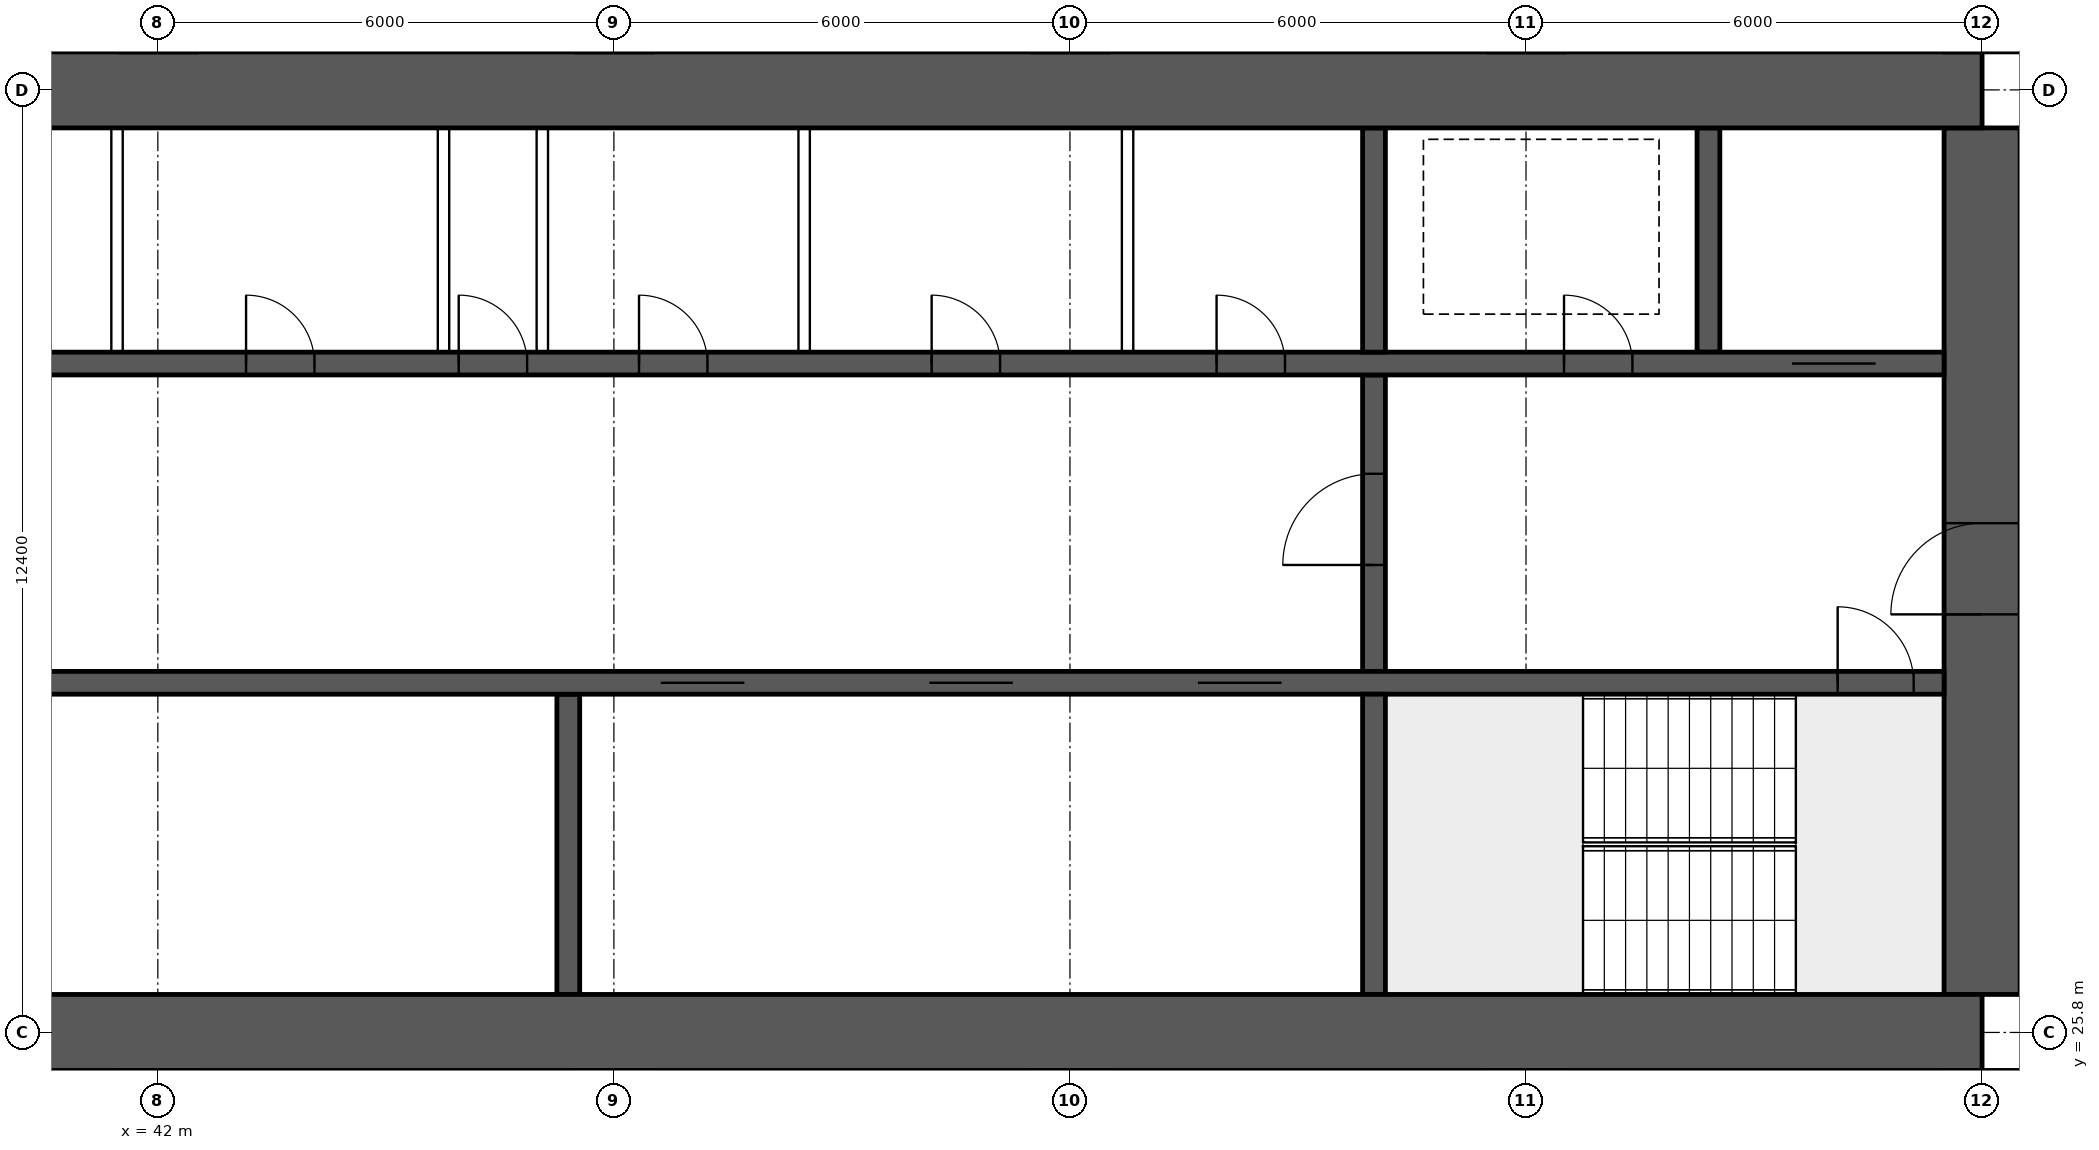
"""IFC4 building model, lengths in metres.
Left out: names, types, materials, properties, quantities, classifications, styles, units other than length and angle.
Written with IfcOpenShell. Run it as: python <this file> out.ifc"""

import sys

from ifc_helpers import new_model, si_unit, direction, frame, frame_2d, origin, place, context, subcontext, project, spatial, rectangle, extrude, element, fill, save


model = new_model("IFC4")
c1 = context("Model", 3, precision=1e-05, world=origin(), true_north=direction((0.0, 1.0)))
c2 = subcontext(c1, "Body", "Model", "MODEL_VIEW")
j1 = project(units=[si_unit("LENGTHUNIT", "METRE"), si_unit("PLANEANGLEUNIT", "RADIAN")], contexts=[c1])
p1 = place(None, origin())
s1 = spatial("IfcSite", under=j1, at=p1, CompositionType="ELEMENT")
p2 = place(p1, origin())
s2 = spatial("IfcBuilding", under=s1, at=p2, CompositionType="ELEMENT")
p3 = place(p2, frame((0.0, 0.0, 23.95)))
s3 = spatial("IfcBuildingStorey", under=s2, at=p3, CompositionType="ELEMENT", Elevation=23.95)
for number, where, z_axis, x_axis in (
    (1, (18.0, 25.8, 0.0), (0.0, 0.0, 1.0), (1.0, 0.0, 0.0)),
    (2, (18.0, 38.2, 0.0), (0.0, 0.0, 1.0), (1.0, 0.0, 0.0)),
):
    element("IfcWall", number, at=place(p3, frame(where, z_axis=z_axis, x_axis=x_axis)), inside=s3, PredefinedType="SHEAR", context=c2, shape_type="SweptSolid", body=[
        extrude(rectangle(XDim=48.0, YDim=1.0, at=frame_2d((24.0, 0.0))), origin(), (0.0, 0.0, 1.0), 3.75),
    ])
p4 = place(p3, frame((66.0, 26.3, 0.0), z_axis=(0.0, 0.0, 1.0), x_axis=(0.0, 1.0, 0.0)))
e3 = element("IfcWall", 3, at=p4, inside=s3, PredefinedType="SHEAR", context=c2, shape_type="SweptSolid", body=[
    extrude(rectangle(XDim=11.4, YDim=1.0, at=frame_2d((5.7, 0.0))), origin(), (0.0, 0.0, 1.0), 3.75),
])
p5 = place(p4, frame((5.0, 0.0, 0.0)))
e4 = element("IfcOpeningElement", 4, at=p5, cuts=e3, PredefinedType="OPENING", context=c2, shape_type="SweptSolid", body=[
    extrude(rectangle(XDim=1.2, YDim=2.1, at=frame_2d((0.6, 1.05))), frame((0.0, 0.51, 0.0), z_axis=(0.0, -1.0, 0.0), x_axis=(1.0, 0.0, 0.0)), (0.0, 0.0, 1.0), 1.02),
])
p6 = place(p3, frame((18.5, 30.4, 0.0), z_axis=(0.0, 0.0, 1.0), x_axis=(1.0, 0.0, 0.0)))
e5 = element("IfcWall", 5, at=p6, inside=s3, PredefinedType="SHEAR", context=c2, shape_type="SweptSolid", body=[
    extrude(rectangle(XDim=47.0, YDim=0.3, at=frame_2d((23.5, 0.0))), origin(), (0.0, 0.0, 1.0), 3.75),
])
p7 = place(p6, frame((0.4, 0.0, 0.0)))
e6 = element("IfcOpeningElement", 6, at=p7, cuts=e5, PredefinedType="OPENING", context=c2, shape_type="SweptSolid", body=[
    extrude(rectangle(XDim=1.0, YDim=2.1, at=frame_2d((0.5, 1.05))), frame((0.0, 0.16, 0.0), z_axis=(0.0, -1.0, 0.0), x_axis=(1.0, 0.0, 0.0)), (0.0, 0.0, 1.0), 0.32),
])
p8 = place(p6, frame((45.6, 0.0, 0.0)))
e7 = element("IfcOpeningElement", 7, at=p8, cuts=e5, PredefinedType="OPENING", context=c2, shape_type="SweptSolid", body=[
    extrude(rectangle(XDim=1.0, YDim=2.1, at=frame_2d((0.5, 1.05))), frame((0.0, 0.16, 0.0), z_axis=(0.0, -1.0, 0.0), x_axis=(1.0, 0.0, 0.0)), (0.0, 0.0, 1.0), 0.32),
])
p9 = place(p6, frame((8.25, 0.0, 0.0)))
e8 = element("IfcOpeningElement", 8, at=p9, cuts=e5, PredefinedType="OPENING", context=c2, shape_type="SweptSolid", body=[
    extrude(rectangle(XDim=1.1, YDim=2.1, at=frame_2d((0.55, 1.05))), frame((0.0, 0.16, 0.0), z_axis=(0.0, -1.0, 0.0), x_axis=(1.0, 0.0, 0.0)), (0.0, 0.0, 1.0), 0.32),
])
p10 = place(p6, frame((10.85, 0.0, 0.0)))
e9 = element("IfcOpeningElement", 9, at=p10, cuts=e5, PredefinedType="OPENING", context=c2, shape_type="SweptSolid", body=[
    extrude(rectangle(XDim=1.1, YDim=2.1, at=frame_2d((0.55, 1.05))), frame((0.0, 0.16, 0.0), z_axis=(0.0, -1.0, 0.0), x_axis=(1.0, 0.0, 0.0)), (0.0, 0.0, 1.0), 0.32),
])
p11 = place(p6, frame((13.45, 0.0, 0.0)))
e10 = element("IfcOpeningElement", 10, at=p11, cuts=e5, PredefinedType="OPENING", context=c2, shape_type="SweptSolid", body=[
    extrude(rectangle(XDim=1.1, YDim=2.1, at=frame_2d((0.55, 1.05))), frame((0.0, 0.16, 0.0), z_axis=(0.0, -1.0, 0.0), x_axis=(1.0, 0.0, 0.0)), (0.0, 0.0, 1.0), 0.32),
])
p12 = place(p6, frame((16.05, 0.0, 0.0)))
e11 = element("IfcOpeningElement", 11, at=p12, cuts=e5, PredefinedType="OPENING", context=c2, shape_type="SweptSolid", body=[
    extrude(rectangle(XDim=1.1, YDim=2.1, at=frame_2d((0.55, 1.05))), frame((0.0, 0.16, 0.0), z_axis=(0.0, -1.0, 0.0), x_axis=(1.0, 0.0, 0.0)), (0.0, 0.0, 1.0), 0.32),
])
p13 = place(p6, frame((30.117, 0.0, 0.0)))
e12 = element("IfcOpeningElement", 12, at=p13, cuts=e5, PredefinedType="OPENING", context=c2, shape_type="SweptSolid", body=[
    extrude(rectangle(XDim=1.1, YDim=2.1, at=frame_2d((0.55, 1.05))), frame((0.0, 0.16, 0.0), z_axis=(0.0, -1.0, 0.0), x_axis=(1.0, 0.0, 0.0)), (0.0, 0.0, 1.0), 0.32),
])
p14 = place(p6, frame((33.65, 0.0, 0.0)))
e13 = element("IfcOpeningElement", 13, at=p14, cuts=e5, PredefinedType="OPENING", context=c2, shape_type="SweptSolid", body=[
    extrude(rectangle(XDim=1.1, YDim=2.1, at=frame_2d((0.55, 1.05))), frame((0.0, 0.16, 0.0), z_axis=(0.0, -1.0, 0.0), x_axis=(1.0, 0.0, 0.0)), (0.0, 0.0, 1.0), 0.32),
])
p15 = place(p6, frame((37.183, 0.0, 0.0)))
e14 = element("IfcOpeningElement", 14, at=p15, cuts=e5, PredefinedType="OPENING", context=c2, shape_type="SweptSolid", body=[
    extrude(rectangle(XDim=1.1, YDim=2.1, at=frame_2d((0.55, 1.05))), frame((0.0, 0.16, 0.0), z_axis=(0.0, -1.0, 0.0), x_axis=(1.0, 0.0, 0.0)), (0.0, 0.0, 1.0), 0.32),
])
p16 = place(p3, frame((18.5, 34.6, 0.0), z_axis=(0.0, 0.0, 1.0), x_axis=(1.0, 0.0, 0.0)))
e15 = element("IfcWall", 15, at=p16, inside=s3, PredefinedType="SHEAR", context=c2, shape_type="SweptSolid", body=[
    extrude(rectangle(XDim=47.0, YDim=0.3, at=frame_2d((23.5, 0.0))), origin(), (0.0, 0.0, 1.0), 3.75),
])
p17 = place(p16, frame((0.9, 0.0, 0.0)))
e16 = element("IfcOpeningElement", 16, at=p17, cuts=e15, PredefinedType="OPENING", context=c2, shape_type="SweptSolid", body=[
    extrude(rectangle(XDim=1.1, YDim=2.1, at=frame_2d((0.55, 1.05))), frame((0.0, 0.16, 0.0), z_axis=(0.0, -1.0, 0.0), x_axis=(1.0, 0.0, 0.0)), (0.0, 0.0, 1.0), 0.32),
])
p18 = place(p16, frame((45.0, 0.0, 0.0)))
e17 = element("IfcOpeningElement", 17, at=p18, cuts=e15, PredefinedType="OPENING", context=c2, shape_type="SweptSolid", body=[
    extrude(rectangle(XDim=1.1, YDim=2.1, at=frame_2d((0.55, 1.05))), frame((0.0, 0.16, 0.0), z_axis=(0.0, -1.0, 0.0), x_axis=(1.0, 0.0, 0.0)), (0.0, 0.0, 1.0), 0.32),
])
p19 = place(p16, frame((4.1, 0.0, 0.0)))
e18 = element("IfcOpeningElement", 18, at=p19, cuts=e15, PredefinedType="OPENING", context=c2, shape_type="SweptSolid", body=[
    extrude(rectangle(XDim=0.9, YDim=2.1, at=frame_2d((0.45, 1.05))), frame((0.0, 0.16, 0.0), z_axis=(0.0, -1.0, 0.0), x_axis=(1.0, 0.0, 0.0)), (0.0, 0.0, 1.0), 0.32),
])
p20 = place(p16, frame((42.0, 0.0, 0.0)))
e19 = element("IfcOpeningElement", 19, at=p20, cuts=e15, PredefinedType="OPENING", context=c2, shape_type="SweptSolid", body=[
    extrude(rectangle(XDim=0.9, YDim=2.1, at=frame_2d((0.45, 1.05))), frame((0.0, 0.16, 0.0), z_axis=(0.0, -1.0, 0.0), x_axis=(1.0, 0.0, 0.0)), (0.0, 0.0, 1.0), 0.32),
])
p21 = place(p16, frame((8.875, 0.0, 0.0)))
e20 = element("IfcOpeningElement", 20, at=p21, cuts=e15, PredefinedType="OPENING", context=c2, shape_type="SweptSolid", body=[
    extrude(rectangle(XDim=0.9, YDim=2.1, at=frame_2d((0.45, 1.05))), frame((0.0, 0.16, 0.0), z_axis=(0.0, -1.0, 0.0), x_axis=(1.0, 0.0, 0.0)), (0.0, 0.0, 1.0), 0.32),
])
p22 = place(p16, frame((12.849, 0.0, 0.0)))
e21 = element("IfcOpeningElement", 21, at=p22, cuts=e15, PredefinedType="OPENING", context=c2, shape_type="SweptSolid", body=[
    extrude(rectangle(XDim=0.9, YDim=2.1, at=frame_2d((0.45, 1.05))), frame((0.0, 0.16, 0.0), z_axis=(0.0, -1.0, 0.0), x_axis=(1.0, 0.0, 0.0)), (0.0, 0.0, 1.0), 0.32),
])
p23 = place(p16, frame((16.496, 0.0, 0.0)))
e22 = element("IfcOpeningElement", 22, at=p23, cuts=e15, PredefinedType="OPENING", context=c2, shape_type="SweptSolid", body=[
    extrude(rectangle(XDim=0.9, YDim=2.1, at=frame_2d((0.45, 1.05))), frame((0.0, 0.16, 0.0), z_axis=(0.0, -1.0, 0.0), x_axis=(1.0, 0.0, 0.0)), (0.0, 0.0, 1.0), 0.32),
])
p24 = place(p16, frame((20.255, 0.0, 0.0)))
e23 = element("IfcOpeningElement", 23, at=p24, cuts=e15, PredefinedType="OPENING", context=c2, shape_type="SweptSolid", body=[
    extrude(rectangle(XDim=0.9, YDim=2.1, at=frame_2d((0.45, 1.05))), frame((0.0, 0.16, 0.0), z_axis=(0.0, -1.0, 0.0), x_axis=(1.0, 0.0, 0.0)), (0.0, 0.0, 1.0), 0.32),
])
p25 = place(p16, frame((24.661, 0.0, 0.0)))
e24 = element("IfcOpeningElement", 24, at=p25, cuts=e15, PredefinedType="OPENING", context=c2, shape_type="SweptSolid", body=[
    extrude(rectangle(XDim=0.9, YDim=2.1, at=frame_2d((0.45, 1.05))), frame((0.0, 0.16, 0.0), z_axis=(0.0, -1.0, 0.0), x_axis=(1.0, 0.0, 0.0)), (0.0, 0.0, 1.0), 0.32),
])
p26 = place(p16, frame((27.458, 0.0, 0.0)))
e25 = element("IfcOpeningElement", 25, at=p26, cuts=e15, PredefinedType="OPENING", context=c2, shape_type="SweptSolid", body=[
    extrude(rectangle(XDim=0.9, YDim=2.1, at=frame_2d((0.45, 1.05))), frame((0.0, 0.16, 0.0), z_axis=(0.0, -1.0, 0.0), x_axis=(1.0, 0.0, 0.0)), (0.0, 0.0, 1.0), 0.32),
])
p27 = place(p16, frame((29.831, 0.0, 0.0)))
e26 = element("IfcOpeningElement", 26, at=p27, cuts=e15, PredefinedType="OPENING", context=c2, shape_type="SweptSolid", body=[
    extrude(rectangle(XDim=0.9, YDim=2.1, at=frame_2d((0.45, 1.05))), frame((0.0, 0.16, 0.0), z_axis=(0.0, -1.0, 0.0), x_axis=(1.0, 0.0, 0.0)), (0.0, 0.0, 1.0), 0.32),
])
p28 = place(p16, frame((33.68, 0.0, 0.0)))
e27 = element("IfcOpeningElement", 27, at=p28, cuts=e15, PredefinedType="OPENING", context=c2, shape_type="SweptSolid", body=[
    extrude(rectangle(XDim=0.9, YDim=2.1, at=frame_2d((0.45, 1.05))), frame((0.0, 0.16, 0.0), z_axis=(0.0, -1.0, 0.0), x_axis=(1.0, 0.0, 0.0)), (0.0, 0.0, 1.0), 0.32),
])
p29 = place(p16, frame((37.429, 0.0, 0.0)))
e28 = element("IfcOpeningElement", 28, at=p29, cuts=e15, PredefinedType="OPENING", context=c2, shape_type="SweptSolid", body=[
    extrude(rectangle(XDim=0.9, YDim=2.1, at=frame_2d((0.45, 1.05))), frame((0.0, 0.16, 0.0), z_axis=(0.0, -1.0, 0.0), x_axis=(1.0, 0.0, 0.0)), (0.0, 0.0, 1.0), 0.32),
])
p30 = place(p3, frame((58.0, 26.3, 0.0), z_axis=(0.0, 0.0, 1.0), x_axis=(0.0, 1.0, 0.0)))
e29 = element("IfcWall", 29, at=p30, inside=s3, PredefinedType="SHEAR", context=c2, shape_type="SweptSolid", body=[
    extrude(rectangle(XDim=3.95, YDim=0.3, at=frame_2d((1.975, 0.0))), origin(), (0.0, 0.0, 1.0), 3.75),
])
p31 = place(p3, frame((58.0, 30.55, 0.0), z_axis=(0.0, 0.0, 1.0), x_axis=(0.0, 1.0, 0.0)))
e30 = element("IfcWall", 30, at=p31, inside=s3, PredefinedType="SHEAR", context=c2, shape_type="SweptSolid", body=[
    extrude(rectangle(XDim=3.9, YDim=0.3, at=frame_2d((1.95, 0.0))), origin(), (0.0, 0.0, 1.0), 3.75),
])
p32 = place(p31, frame((1.4, 0.0, 0.0)))
e31 = element("IfcOpeningElement", 31, at=p32, cuts=e30, PredefinedType="OPENING", context=c2, shape_type="SweptSolid", body=[
    extrude(rectangle(XDim=1.2, YDim=2.1, at=frame_2d((0.6, 1.05))), frame((0.0, 0.16, 0.0), z_axis=(0.0, -1.0, 0.0), x_axis=(1.0, 0.0, 0.0)), (0.0, 0.0, 1.0), 0.32),
])
for number, where, z_axis, x_axis in (
    (32, (62.4, 34.75, 0.0), (0.0, 0.0, 1.0), (0.0, 1.0, 0.0)),
    (33, (58.0, 34.75, 0.0), (0.0, 0.0, 1.0), (0.0, 1.0, 0.0)),
):
    element("IfcWall", number, at=place(p3, frame(where, z_axis=z_axis, x_axis=x_axis)), inside=s3, PredefinedType="SHEAR", context=c2, shape_type="SweptSolid", body=[
        extrude(rectangle(XDim=2.95, YDim=0.3, at=frame_2d((1.475, 0.0))), origin(), (0.0, 0.0, 1.0), 3.75),
    ])
p33 = place(p3, frame((47.4, 26.3, 0.0), z_axis=(0.0, 0.0, 1.0), x_axis=(0.0, 1.0, 0.0)))
e34 = element("IfcWall", 34, at=p33, inside=s3, PredefinedType="SHEAR", context=c2, shape_type="SweptSolid", body=[
    extrude(rectangle(XDim=3.95, YDim=0.3, at=frame_2d((1.975, 0.0))), origin(), (0.0, 0.0, 1.0), 3.75),
])
for number, where, z_axis, x_axis in (
    (35, (41.463, 34.75, 0.0), (0.0, 0.0, 1.0), (0.0, 1.0, 0.0)),
    (36, (45.758, 34.75, 0.0), (0.0, 0.0, 1.0), (0.0, 1.0, 0.0)),
    (37, (47.058, 34.75, 0.0), (0.0, 0.0, 1.0), (0.0, 1.0, 0.0)),
    (38, (50.503, 34.75, 0.0), (0.0, 0.0, 1.0), (0.0, 1.0, 0.0)),
    (39, (54.758, 34.75, 0.0), (0.0, 0.0, 1.0), (0.0, 1.0, 0.0)),
):
    element("IfcWall", number, at=place(p3, frame(where, z_axis=z_axis, x_axis=x_axis)), inside=s3, PredefinedType="SOLIDWALL", context=c2, shape_type="SweptSolid", body=[
        extrude(rectangle(XDim=2.95, YDim=0.15, at=frame_2d((1.475, 0.0))), origin(), (0.0, 0.0, 1.0), 3.5),
    ])
for number, where, z_axis, x_axis in (
    (40, (44.6, 14.9, 0.0), (0.0, 0.0, 1.0), (0.0, 1.0, 0.0)),
    (41, (57.6, 14.9, 0.0), (0.0, 0.0, 1.0), (0.0, 1.0, 0.0)),
):
    element("IfcWall", number, at=place(p3, frame(where, z_axis=z_axis, x_axis=x_axis)), inside=s3, PredefinedType="PARTITIONING", context=c2, shape_type="SweptSolid", body=[
        extrude(rectangle(XDim=10.4, YDim=0.15, at=frame_2d((5.2, 0.0))), origin(), (0.0, 0.0, 1.0), 3.5),
    ])
p34 = place(p5, origin())
e42 = element("IfcDoor", 42, at=p34, inside=s3, OperationType="SINGLE_SWING_LEFT", PredefinedType="DOOR", context=c2, shape_type="SweptSolid", body=[
    extrude(rectangle(XDim=1.2, YDim=2.1, at=frame_2d((0.6, 1.05))), frame((0.0, 0.025, 0.0), z_axis=(0.0, -1.0, 0.0), x_axis=(1.0, 0.0, 0.0)), (0.0, 0.0, 1.0), 0.05),
])
fill(e4, e42)
p35 = place(p8, origin())
e43 = element("IfcDoor", 43, at=p35, inside=s3, OperationType="SINGLE_SWING_LEFT", PredefinedType="DOOR", context=c2, shape_type="SweptSolid", body=[
    extrude(rectangle(XDim=1.0, YDim=2.1, at=frame_2d((0.5, 1.05))), frame((0.0, 0.025, 0.0), z_axis=(0.0, -1.0, 0.0), x_axis=(1.0, 0.0, 0.0)), (0.0, 0.0, 1.0), 0.05),
])
fill(e7, e43)
p36 = place(p18, origin())
e44 = element("IfcDoor", 44, at=p36, inside=s3, OperationType="DOUBLE_DOOR_SLIDING", PredefinedType="DOOR", context=c2, shape_type="SweptSolid", body=[
    extrude(rectangle(XDim=1.1, YDim=2.1, at=frame_2d((0.55, 1.05))), frame((0.0, 0.025, 0.0), z_axis=(0.0, -1.0, 0.0), x_axis=(1.0, 0.0, 0.0)), (0.0, 0.0, 1.0), 0.05),
])
fill(e17, e44)
p37 = place(p20, origin())
e45 = element("IfcDoor", 45, at=p37, inside=s3, OperationType="SINGLE_SWING_LEFT", PredefinedType="DOOR", context=c2, shape_type="SweptSolid", body=[
    extrude(rectangle(XDim=0.9, YDim=2.1, at=frame_2d((0.45, 1.05))), frame((0.0, 0.025, 0.0), z_axis=(0.0, -1.0, 0.0), x_axis=(1.0, 0.0, 0.0)), (0.0, 0.0, 1.0), 0.05),
])
fill(e19, e45)
p38 = place(p32, origin())
e46 = element("IfcDoor", 46, at=p38, inside=s3, OperationType="SINGLE_SWING_LEFT", PredefinedType="DOOR", context=c2, shape_type="SweptSolid", body=[
    extrude(rectangle(XDim=1.2, YDim=2.1, at=frame_2d((0.6, 1.05))), frame((0.0, 0.025, 0.0), z_axis=(0.0, -1.0, 0.0), x_axis=(1.0, 0.0, 0.0)), (0.0, 0.0, 1.0), 0.05),
])
fill(e31, e46)
p39 = place(p25, origin())
e47 = element("IfcDoor", 47, at=p39, inside=s3, OperationType="SINGLE_SWING_LEFT", PredefinedType="DOOR", context=c2, shape_type="SweptSolid", body=[
    extrude(rectangle(XDim=0.9, YDim=2.1, at=frame_2d((0.45, 1.05))), frame((0.0, 0.025, 0.0), z_axis=(0.0, -1.0, 0.0), x_axis=(1.0, 0.0, 0.0)), (0.0, 0.0, 1.0), 0.05),
])
fill(e24, e47)
p40 = place(p26, origin())
e48 = element("IfcDoor", 48, at=p40, inside=s3, OperationType="SINGLE_SWING_LEFT", PredefinedType="DOOR", context=c2, shape_type="SweptSolid", body=[
    extrude(rectangle(XDim=0.9, YDim=2.1, at=frame_2d((0.45, 1.05))), frame((0.0, 0.025, 0.0), z_axis=(0.0, -1.0, 0.0), x_axis=(1.0, 0.0, 0.0)), (0.0, 0.0, 1.0), 0.05),
])
fill(e25, e48)
p41 = place(p27, origin())
e49 = element("IfcDoor", 49, at=p41, inside=s3, OperationType="SINGLE_SWING_LEFT", PredefinedType="DOOR", context=c2, shape_type="SweptSolid", body=[
    extrude(rectangle(XDim=0.9, YDim=2.1, at=frame_2d((0.45, 1.05))), frame((0.0, 0.025, 0.0), z_axis=(0.0, -1.0, 0.0), x_axis=(1.0, 0.0, 0.0)), (0.0, 0.0, 1.0), 0.05),
])
fill(e26, e49)
p42 = place(p28, origin())
e50 = element("IfcDoor", 50, at=p42, inside=s3, OperationType="SINGLE_SWING_LEFT", PredefinedType="DOOR", context=c2, shape_type="SweptSolid", body=[
    extrude(rectangle(XDim=0.9, YDim=2.1, at=frame_2d((0.45, 1.05))), frame((0.0, 0.025, 0.0), z_axis=(0.0, -1.0, 0.0), x_axis=(1.0, 0.0, 0.0)), (0.0, 0.0, 1.0), 0.05),
])
fill(e27, e50)
p43 = place(p29, origin())
e51 = element("IfcDoor", 51, at=p43, inside=s3, OperationType="SINGLE_SWING_LEFT", PredefinedType="DOOR", context=c2, shape_type="SweptSolid", body=[
    extrude(rectangle(XDim=0.9, YDim=2.1, at=frame_2d((0.45, 1.05))), frame((0.0, 0.025, 0.0), z_axis=(0.0, -1.0, 0.0), x_axis=(1.0, 0.0, 0.0)), (0.0, 0.0, 1.0), 0.05),
])
fill(e28, e51)
p44 = place(p13, origin())
e52 = element("IfcDoor", 52, at=p44, inside=s3, OperationType="DOUBLE_DOOR_SLIDING", PredefinedType="DOOR", context=c2, shape_type="SweptSolid", body=[
    extrude(rectangle(XDim=1.1, YDim=2.1, at=frame_2d((0.55, 1.05))), frame((0.0, 0.025, 0.0), z_axis=(0.0, -1.0, 0.0), x_axis=(1.0, 0.0, 0.0)), (0.0, 0.0, 1.0), 0.05),
])
fill(e12, e52)
p45 = place(p14, origin())
e53 = element("IfcDoor", 53, at=p45, inside=s3, OperationType="DOUBLE_DOOR_SLIDING", PredefinedType="DOOR", context=c2, shape_type="SweptSolid", body=[
    extrude(rectangle(XDim=1.1, YDim=2.1, at=frame_2d((0.55, 1.05))), frame((0.0, 0.025, 0.0), z_axis=(0.0, -1.0, 0.0), x_axis=(1.0, 0.0, 0.0)), (0.0, 0.0, 1.0), 0.05),
])
fill(e13, e53)
p46 = place(p15, origin())
e54 = element("IfcDoor", 54, at=p46, inside=s3, OperationType="DOUBLE_DOOR_SLIDING", PredefinedType="DOOR", context=c2, shape_type="SweptSolid", body=[
    extrude(rectangle(XDim=1.1, YDim=2.1, at=frame_2d((0.55, 1.05))), frame((0.0, 0.025, 0.0), z_axis=(0.0, -1.0, 0.0), x_axis=(1.0, 0.0, 0.0)), (0.0, 0.0, 1.0), 0.05),
])
fill(e14, e54)
save(model, sys.argv[1])
